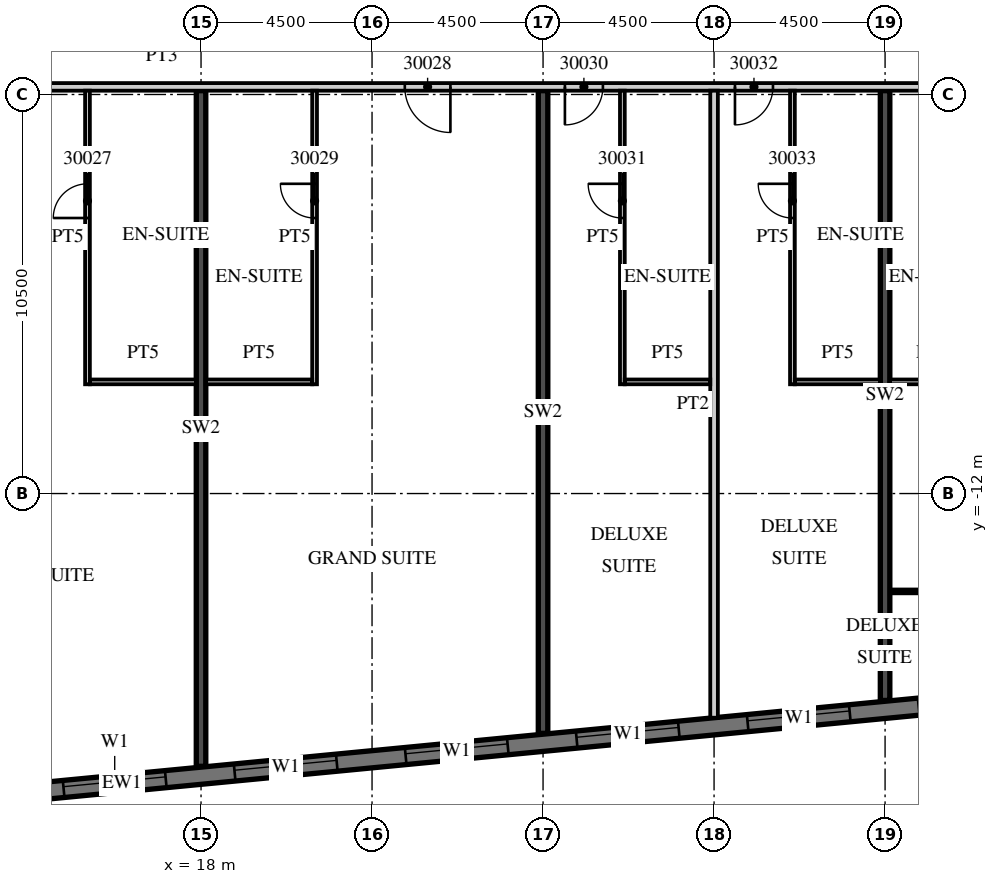
"""IFC4 building model, lengths in metres.
Left out: names, types, materials, properties, quantities, classifications, styles, units other than length and angle.
Written with IfcOpenShell. Run it as: python <this file> out.ifc"""

import sys

from ifc_helpers import new_model, si_unit, direction, frame, frame_2d, origin, place, context, subcontext, project, spatial, rectangle, extrude, element, fill, save


model = new_model("IFC4")
c1 = context("Model", 3, precision=1e-05, world=origin(), true_north=direction((0.0, 1.0)))
c2 = subcontext(c1, "Body", "Model", "MODEL_VIEW")
j1 = project(units=[si_unit("LENGTHUNIT", "METRE"), si_unit("PLANEANGLEUNIT", "RADIAN")], contexts=[c1])
p1 = place(None, origin())
s1 = spatial("IfcSite", under=j1, at=p1, CompositionType="ELEMENT")
p2 = place(p1, origin())
s2 = spatial("IfcBuilding", under=s1, at=p2, CompositionType="ELEMENT")
p3 = place(p2, frame((0.0, 0.0, 133.9)))
s3 = spatial("IfcBuildingStorey", under=s2, at=p3, CompositionType="ELEMENT", Elevation=133.9)
p4 = place(p3, frame((18.0, -19.177, 0.0), z_axis=(0.0, 0.0, 1.0), x_axis=(0.0, 1.0, 0.0)))
e1 = element("IfcWall", 1, at=p4, inside=s3, PredefinedType="SHEAR", context=c2, shape_type="SweptSolid", body=[
    extrude(rectangle(XDim=17.777, YDim=0.25, at=frame_2d((8.889, 0.0))), origin(), (0.0, 0.0, 1.0), 3.3),
])
p5 = place(p3, frame((27.0, -18.311, 0.0), z_axis=(0.0, 0.0, 1.0), x_axis=(0.0, 1.0, 0.0)))
e2 = element("IfcWall", 2, at=p5, inside=s3, PredefinedType="SHEAR", context=c2, shape_type="SweptSolid", body=[
    extrude(rectangle(XDim=16.911, YDim=0.25, at=frame_2d((8.455, 0.0))), origin(), (0.0, 0.0, 1.0), 3.3),
])
p6 = place(p3, frame((36.0, -17.444, 0.0), z_axis=(0.0, 0.0, 1.0), x_axis=(0.0, 1.0, 0.0)))
e3 = element("IfcWall", 3, at=p6, inside=s3, PredefinedType="SHEAR", context=c2, shape_type="SweptSolid", body=[
    extrude(rectangle(XDim=16.044, YDim=0.25, at=frame_2d((8.022, 0.0))), origin(), (0.0, 0.0, 1.0), 3.3),
])
p7 = place(p3, frame((-13.521, -22.46, 0.0), z_axis=(0.0, 0.0, 1.0), x_axis=(0.995396096335, 0.095846812164, 0.0)))
e4 = element("IfcWall", 4, at=p7, inside=s3, PredefinedType="SOLIDWALL", context=c2, shape_type="SweptSolid", body=[
    extrude(rectangle(XDim=59.151, YDim=0.45, at=frame_2d((29.575, 0.0))), origin(), (0.0, 0.0, 1.0), 3.02),
])
p8 = place(p7, frame((0.91, 0.0, 0.45)))
e5 = element("IfcOpeningElement", 5, at=p8, cuts=e4, PredefinedType="OPENING", context=c2, shape_type="SweptSolid", body=[
    extrude(rectangle(XDim=2.7, YDim=2.25, at=frame_2d((1.35, 1.125))), frame((0.0, 0.235, 0.0), z_axis=(0.0, -1.0, 0.0), x_axis=(1.0, 0.0, 0.0)), (0.0, 0.0, 1.0), 0.47),
])
p9 = place(p7, frame((5.431, 0.0, 0.45)))
e6 = element("IfcOpeningElement", 6, at=p9, cuts=e4, PredefinedType="OPENING", context=c2, shape_type="SweptSolid", body=[
    extrude(rectangle(XDim=2.7, YDim=2.25, at=frame_2d((1.35, 1.125))), frame((0.0, 0.235, 0.0), z_axis=(0.0, -1.0, 0.0), x_axis=(1.0, 0.0, 0.0)), (0.0, 0.0, 1.0), 0.47),
])
p10 = place(p7, frame((9.952, 0.0, 0.45)))
e7 = element("IfcOpeningElement", 7, at=p10, cuts=e4, PredefinedType="OPENING", context=c2, shape_type="SweptSolid", body=[
    extrude(rectangle(XDim=2.7, YDim=2.25, at=frame_2d((1.35, 1.125))), frame((0.0, 0.235, 0.0), z_axis=(0.0, -1.0, 0.0), x_axis=(1.0, 0.0, 0.0)), (0.0, 0.0, 1.0), 0.47),
])
p11 = place(p7, frame((14.473, 0.0, 0.45)))
e8 = element("IfcOpeningElement", 8, at=p11, cuts=e4, PredefinedType="OPENING", context=c2, shape_type="SweptSolid", body=[
    extrude(rectangle(XDim=2.7, YDim=2.25, at=frame_2d((1.35, 1.125))), frame((0.0, 0.235, 0.0), z_axis=(0.0, -1.0, 0.0), x_axis=(1.0, 0.0, 0.0)), (0.0, 0.0, 1.0), 0.47),
])
p12 = place(p7, frame((18.994, 0.0, 0.45)))
e9 = element("IfcOpeningElement", 9, at=p12, cuts=e4, PredefinedType="OPENING", context=c2, shape_type="SweptSolid", body=[
    extrude(rectangle(XDim=2.7, YDim=2.25, at=frame_2d((1.35, 1.125))), frame((0.0, 0.235, 0.0), z_axis=(0.0, -1.0, 0.0), x_axis=(1.0, 0.0, 0.0)), (0.0, 0.0, 1.0), 0.47),
])
p13 = place(p7, frame((23.514, 0.0, 0.45)))
e10 = element("IfcOpeningElement", 10, at=p13, cuts=e4, PredefinedType="OPENING", context=c2, shape_type="SweptSolid", body=[
    extrude(rectangle(XDim=2.7, YDim=2.25, at=frame_2d((1.35, 1.125))), frame((0.0, 0.235, 0.0), z_axis=(0.0, -1.0, 0.0), x_axis=(1.0, 0.0, 0.0)), (0.0, 0.0, 1.0), 0.47),
])
p14 = place(p7, frame((28.035, 0.0, 0.45)))
e11 = element("IfcOpeningElement", 11, at=p14, cuts=e4, PredefinedType="OPENING", context=c2, shape_type="SweptSolid", body=[
    extrude(rectangle(XDim=2.7, YDim=2.25, at=frame_2d((1.35, 1.125))), frame((0.0, 0.235, 0.0), z_axis=(0.0, -1.0, 0.0), x_axis=(1.0, 0.0, 0.0)), (0.0, 0.0, 1.0), 0.47),
])
p15 = place(p7, frame((32.556, 0.0, 0.45)))
e12 = element("IfcOpeningElement", 12, at=p15, cuts=e4, PredefinedType="OPENING", context=c2, shape_type="SweptSolid", body=[
    extrude(rectangle(XDim=2.7, YDim=2.25, at=frame_2d((1.35, 1.125))), frame((0.0, 0.235, 0.0), z_axis=(0.0, -1.0, 0.0), x_axis=(1.0, 0.0, 0.0)), (0.0, 0.0, 1.0), 0.47),
])
p16 = place(p7, frame((37.077, 0.0, 0.45)))
e13 = element("IfcOpeningElement", 13, at=p16, cuts=e4, PredefinedType="OPENING", context=c2, shape_type="SweptSolid", body=[
    extrude(rectangle(XDim=2.7, YDim=2.25, at=frame_2d((1.35, 1.125))), frame((0.0, 0.235, 0.0), z_axis=(0.0, -1.0, 0.0), x_axis=(1.0, 0.0, 0.0)), (0.0, 0.0, 1.0), 0.47),
])
p17 = place(p7, frame((41.598, 0.0, 0.45)))
e14 = element("IfcOpeningElement", 14, at=p17, cuts=e4, PredefinedType="OPENING", context=c2, shape_type="SweptSolid", body=[
    extrude(rectangle(XDim=2.7, YDim=2.25, at=frame_2d((1.35, 1.125))), frame((0.0, 0.235, 0.0), z_axis=(0.0, -1.0, 0.0), x_axis=(1.0, 0.0, 0.0)), (0.0, 0.0, 1.0), 0.47),
])
p18 = place(p7, frame((46.118, 0.0, 0.45)))
e15 = element("IfcOpeningElement", 15, at=p18, cuts=e4, PredefinedType="OPENING", context=c2, shape_type="SweptSolid", body=[
    extrude(rectangle(XDim=2.7, YDim=2.25, at=frame_2d((1.35, 1.125))), frame((0.0, 0.235, 0.0), z_axis=(0.0, -1.0, 0.0), x_axis=(1.0, 0.0, 0.0)), (0.0, 0.0, 1.0), 0.47),
])
p19 = place(p7, frame((50.639, 0.0, 0.45)))
e16 = element("IfcOpeningElement", 16, at=p19, cuts=e4, PredefinedType="OPENING", context=c2, shape_type="SweptSolid", body=[
    extrude(rectangle(XDim=2.7, YDim=2.25, at=frame_2d((1.35, 1.125))), frame((0.0, 0.235, 0.0), z_axis=(0.0, -1.0, 0.0), x_axis=(1.0, 0.0, 0.0)), (0.0, 0.0, 1.0), 0.47),
])
p20 = place(p7, frame((55.15, 0.0, 0.45)))
e17 = element("IfcOpeningElement", 17, at=p20, cuts=e4, PredefinedType="OPENING", context=c2, shape_type="SweptSolid", body=[
    extrude(rectangle(XDim=2.7, YDim=2.25, at=frame_2d((1.35, 1.125))), frame((0.0, 0.235, 0.0), z_axis=(0.0, -1.0, 0.0), x_axis=(1.0, 0.0, 0.0)), (0.0, 0.0, 1.0), 0.47),
])
p21 = place(p3, frame((-13.5, -1.3, 0.0), z_axis=(0.0, 0.0, 1.0), x_axis=(1.0, 0.0, 0.0)))
e18 = element("IfcWall", 18, at=p21, inside=s3, PredefinedType="PARTITIONING", context=c2, shape_type="SweptSolid", body=[
    extrude(rectangle(XDim=60.932, YDim=0.2, at=frame_2d((30.466, 0.0))), origin(), (0.0, 0.0, 1.0), 3.02),
])
p22 = place(p21, frame((2.925, 0.0, 0.0)))
e19 = element("IfcOpeningElement", 19, at=p22, cuts=e18, PredefinedType="OPENING", context=c2, shape_type="SweptSolid", body=[
    extrude(rectangle(XDim=1.0, YDim=2.1, at=frame_2d((0.5, 1.05))), frame((0.0, 0.11, 0.0), z_axis=(0.0, -1.0, 0.0), x_axis=(1.0, 0.0, 0.0)), (0.0, 0.0, 1.0), 0.22),
])
p23 = place(p21, frame((9.863, 0.0, 0.0)))
e20 = element("IfcOpeningElement", 20, at=p23, cuts=e18, PredefinedType="OPENING", context=c2, shape_type="SweptSolid", body=[
    extrude(rectangle(XDim=1.2, YDim=2.1, at=frame_2d((0.6, 1.05))), frame((0.0, 0.11, 0.0), z_axis=(0.0, -1.0, 0.0), x_axis=(1.0, 0.0, 0.0)), (0.0, 0.0, 1.0), 0.22),
])
p24 = place(p21, frame((14.075, 0.0, 0.0)))
e21 = element("IfcOpeningElement", 21, at=p24, cuts=e18, PredefinedType="OPENING", context=c2, shape_type="SweptSolid", body=[
    extrude(rectangle(XDim=1.0, YDim=2.1, at=frame_2d((0.5, 1.05))), frame((0.0, 0.11, 0.0), z_axis=(0.0, -1.0, 0.0), x_axis=(1.0, 0.0, 0.0)), (0.0, 0.0, 1.0), 0.22),
])
p25 = place(p21, frame((18.55, 0.0, 0.0)))
e22 = element("IfcOpeningElement", 22, at=p25, cuts=e18, PredefinedType="OPENING", context=c2, shape_type="SweptSolid", body=[
    extrude(rectangle(XDim=1.0, YDim=2.1, at=frame_2d((0.5, 1.05))), frame((0.0, 0.11, 0.0), z_axis=(0.0, -1.0, 0.0), x_axis=(1.0, 0.0, 0.0)), (0.0, 0.0, 1.0), 0.22),
])
p26 = place(p21, frame((24.938, 0.0, 0.0)))
e23 = element("IfcOpeningElement", 23, at=p26, cuts=e18, PredefinedType="OPENING", context=c2, shape_type="SweptSolid", body=[
    extrude(rectangle(XDim=1.2, YDim=2.1, at=frame_2d((0.6, 1.05))), frame((0.0, 0.11, 0.0), z_axis=(0.0, -1.0, 0.0), x_axis=(1.0, 0.0, 0.0)), (0.0, 0.0, 1.0), 0.22),
])
p27 = place(p21, frame((36.862, 0.0, 0.0)))
e24 = element("IfcOpeningElement", 24, at=p27, cuts=e18, PredefinedType="OPENING", context=c2, shape_type="SweptSolid", body=[
    extrude(rectangle(XDim=1.2, YDim=2.1, at=frame_2d((0.6, 1.05))), frame((0.0, 0.11, 0.0), z_axis=(0.0, -1.0, 0.0), x_axis=(1.0, 0.0, 0.0)), (0.0, 0.0, 1.0), 0.22),
])
p28 = place(p21, frame((41.075, 0.0, 0.0)))
e25 = element("IfcOpeningElement", 25, at=p28, cuts=e18, PredefinedType="OPENING", context=c2, shape_type="SweptSolid", body=[
    extrude(rectangle(XDim=1.0, YDim=2.1, at=frame_2d((0.5, 1.05))), frame((0.0, 0.11, 0.0), z_axis=(0.0, -1.0, 0.0), x_axis=(1.0, 0.0, 0.0)), (0.0, 0.0, 1.0), 0.22),
])
p29 = place(p21, frame((45.55, 0.0, 0.0)))
e26 = element("IfcOpeningElement", 26, at=p29, cuts=e18, PredefinedType="OPENING", context=c2, shape_type="SweptSolid", body=[
    extrude(rectangle(XDim=1.0, YDim=2.1, at=frame_2d((0.5, 1.05))), frame((0.0, 0.11, 0.0), z_axis=(0.0, -1.0, 0.0), x_axis=(1.0, 0.0, 0.0)), (0.0, 0.0, 1.0), 0.22),
])
p30 = place(p21, frame((52.425, 0.0, 0.0)))
e27 = element("IfcOpeningElement", 27, at=p30, cuts=e18, PredefinedType="OPENING", context=c2, shape_type="SweptSolid", body=[
    extrude(rectangle(XDim=1.0, YDim=2.1, at=frame_2d((0.5, 1.05))), frame((0.0, 0.11, 0.0), z_axis=(0.0, -1.0, 0.0), x_axis=(1.0, 0.0, 0.0)), (0.0, 0.0, 1.0), 0.22),
])
p31 = place(p21, frame((56.95, 0.0, 0.0)))
e28 = element("IfcOpeningElement", 28, at=p31, cuts=e18, PredefinedType="OPENING", context=c2, shape_type="SweptSolid", body=[
    extrude(rectangle(XDim=1.0, YDim=2.1, at=frame_2d((0.5, 1.05))), frame((0.0, 0.11, 0.0), z_axis=(0.0, -1.0, 0.0), x_axis=(1.0, 0.0, 0.0)), (0.0, 0.0, 1.0), 0.22),
])
p32 = place(p21, frame((59.882, 0.0, 0.0)))
e29 = element("IfcOpeningElement", 29, at=p32, cuts=e18, PredefinedType="OPENING", context=c2, shape_type="SweptSolid", body=[
    extrude(rectangle(XDim=0.9, YDim=2.1, at=frame_2d((0.45, 1.05))), frame((0.0, 0.11, 0.0), z_axis=(0.0, -1.0, 0.0), x_axis=(1.0, 0.0, 0.0)), (0.0, 0.0, 1.0), 0.22),
])
p33 = place(p3, frame((15.012, -9.125, 0.0), z_axis=(0.0, 0.0, 1.0), x_axis=(0.0, 1.0, 0.0)))
e30 = element("IfcWall", 30, at=p33, inside=s3, PredefinedType="PARTITIONING", context=c2, shape_type="SweptSolid", body=[
    extrude(rectangle(XDim=7.725, YDim=0.125, at=frame_2d((3.863, 0.0))), origin(), (0.0, 0.0, 1.0), 3.02),
])
p34 = place(p33, frame((4.375, 0.0, 0.0)))
e31 = element("IfcOpeningElement", 31, at=p34, cuts=e30, PredefinedType="OPENING", context=c2, shape_type="SweptSolid", body=[
    extrude(rectangle(XDim=0.9, YDim=2.1, at=frame_2d((0.45, 1.05))), frame((0.0, 0.073, 0.0), z_axis=(0.0, -1.0, 0.0), x_axis=(1.0, 0.0, 0.0)), (0.0, 0.0, 1.0), 0.145),
])
p35 = place(p3, frame((15.075, -9.062, 0.0), z_axis=(0.0, 0.0, 1.0), x_axis=(1.0, 0.0, 0.0)))
e32 = element("IfcWall", 32, at=p35, inside=s3, PredefinedType="PARTITIONING", context=c2, shape_type="SweptSolid", body=[
    extrude(rectangle(XDim=2.8, YDim=0.125, at=frame_2d((1.4, 0.0))), origin(), (0.0, 0.0, 1.0), 3.02),
])
p36 = place(p3, frame((20.988, -9.125, 0.0), z_axis=(0.0, 0.0, 1.0), x_axis=(0.0, 1.0, 0.0)))
e33 = element("IfcWall", 33, at=p36, inside=s3, PredefinedType="PARTITIONING", context=c2, shape_type="SweptSolid", body=[
    extrude(rectangle(XDim=7.725, YDim=0.125, at=frame_2d((3.863, 0.0))), origin(), (0.0, 0.0, 1.0), 3.02),
])
p37 = place(p36, frame((4.375, 0.0, 0.0)))
e34 = element("IfcOpeningElement", 34, at=p37, cuts=e33, PredefinedType="OPENING", context=c2, shape_type="SweptSolid", body=[
    extrude(rectangle(XDim=0.9, YDim=2.1, at=frame_2d((0.45, 1.05))), frame((0.0, 0.073, 0.0), z_axis=(0.0, -1.0, 0.0), x_axis=(1.0, 0.0, 0.0)), (0.0, 0.0, 1.0), 0.145),
])
p38 = place(p3, frame((18.125, -9.062, 0.0), z_axis=(0.0, 0.0, 1.0), x_axis=(1.0, 0.0, 0.0)))
e35 = element("IfcWall", 35, at=p38, inside=s3, PredefinedType="PARTITIONING", context=c2, shape_type="SweptSolid", body=[
    extrude(rectangle(XDim=2.8, YDim=0.125, at=frame_2d((1.4, 0.0))), origin(), (0.0, 0.0, 1.0), 3.02),
])
p39 = place(p3, frame((31.5, -17.899, 0.0), z_axis=(0.0, 0.0, 1.0), x_axis=(0.0, 1.0, 0.0)))
e36 = element("IfcWall", 36, at=p39, inside=s3, PredefinedType="PARTITIONING", context=c2, shape_type="SweptSolid", body=[
    extrude(rectangle(XDim=16.499, YDim=0.2, at=frame_2d((8.25, 0.0))), origin(), (0.0, 0.0, 1.0), 3.02),
])
p40 = place(p3, frame((29.087, -9.125, 0.0), z_axis=(0.0, 0.0, 1.0), x_axis=(0.0, 1.0, 0.0)))
e37 = element("IfcWall", 37, at=p40, inside=s3, PredefinedType="PARTITIONING", context=c2, shape_type="SweptSolid", body=[
    extrude(rectangle(XDim=7.725, YDim=0.125, at=frame_2d((3.863, 0.0))), origin(), (0.0, 0.0, 1.0), 3.02),
])
p41 = place(p40, frame((4.375, 0.0, 0.0)))
e38 = element("IfcOpeningElement", 38, at=p41, cuts=e37, PredefinedType="OPENING", context=c2, shape_type="SweptSolid", body=[
    extrude(rectangle(XDim=0.9, YDim=2.1, at=frame_2d((0.45, 1.05))), frame((0.0, 0.073, 0.0), z_axis=(0.0, -1.0, 0.0), x_axis=(1.0, 0.0, 0.0)), (0.0, 0.0, 1.0), 0.145),
])
p42 = place(p3, frame((29.15, -9.062, 0.0), z_axis=(0.0, 0.0, 1.0), x_axis=(1.0, 0.0, 0.0)))
e39 = element("IfcWall", 39, at=p42, inside=s3, PredefinedType="PARTITIONING", context=c2, shape_type="SweptSolid", body=[
    extrude(rectangle(XDim=2.25, YDim=0.125, at=frame_2d((1.125, 0.0))), origin(), (0.0, 0.0, 1.0), 3.02),
])
p43 = place(p3, frame((33.562, -9.125, 0.0), z_axis=(0.0, 0.0, 1.0), x_axis=(0.0, 1.0, 0.0)))
e40 = element("IfcWall", 40, at=p43, inside=s3, PredefinedType="PARTITIONING", context=c2, shape_type="SweptSolid", body=[
    extrude(rectangle(XDim=7.725, YDim=0.125, at=frame_2d((3.863, 0.0))), origin(), (0.0, 0.0, 1.0), 3.02),
])
p44 = place(p43, frame((4.375, 0.0, 0.0)))
e41 = element("IfcOpeningElement", 41, at=p44, cuts=e40, PredefinedType="OPENING", context=c2, shape_type="SweptSolid", body=[
    extrude(rectangle(XDim=0.9, YDim=2.1, at=frame_2d((0.45, 1.05))), frame((0.0, 0.073, 0.0), z_axis=(0.0, -1.0, 0.0), x_axis=(1.0, 0.0, 0.0)), (0.0, 0.0, 1.0), 0.145),
])
p45 = place(p3, frame((33.625, -9.062, 0.0), z_axis=(0.0, 0.0, 1.0), x_axis=(1.0, 0.0, 0.0)))
e42 = element("IfcWall", 42, at=p45, inside=s3, PredefinedType="PARTITIONING", context=c2, shape_type="SweptSolid", body=[
    extrude(rectangle(XDim=2.25, YDim=0.125, at=frame_2d((1.125, 0.0))), origin(), (0.0, 0.0, 1.0), 3.02),
])
p46 = place(p3, frame((36.125, -9.062, 0.0), z_axis=(0.0, 0.0, 1.0), x_axis=(1.0, 0.0, 0.0)))
e43 = element("IfcWall", 43, at=p46, inside=s3, PredefinedType="PARTITIONING", context=c2, shape_type="SweptSolid", body=[
    extrude(rectangle(XDim=2.225, YDim=0.125, at=frame_2d((1.113, 0.0))), origin(), (0.0, 0.0, 1.0), 3.02),
])
p47 = place(p3, frame((36.125, -14.575, 0.0), z_axis=(0.0, 0.0, 1.0), x_axis=(1.0, 0.0, 0.0)))
e44 = element("IfcWall", 44, at=p47, inside=s3, PredefinedType="PARTITIONING", context=c2, shape_type="SweptSolid", body=[
    extrude(rectangle(XDim=4.25, YDim=0.1, at=frame_2d((2.125, 0.0))), origin(), (0.0, 0.0, 1.0), 3.02),
])
p48 = place(p47, frame((1.375, 0.0, 0.0)))
e45 = element("IfcOpeningElement", 45, at=p48, cuts=e44, PredefinedType="OPENING", context=c2, shape_type="SweptSolid", body=[
    extrude(rectangle(XDim=1.5, YDim=2.1, at=frame_2d((0.75, 1.05))), frame((0.0, 0.06, 0.0), z_axis=(0.0, -1.0, 0.0), x_axis=(1.0, 0.0, 0.0)), (0.0, 0.0, 1.0), 0.12),
])
p49 = place(p14, origin())
e46 = element("IfcWindow", 46, at=p49, inside=s3, PartitioningType="SINGLE_PANEL", PredefinedType="WINDOW", context=c2, shape_type="SweptSolid", body=[
    extrude(rectangle(XDim=2.7, YDim=2.25, at=frame_2d((1.35, 1.125))), frame((0.0, 0.09, 0.0), z_axis=(0.0, -1.0, 0.0), x_axis=(1.0, 0.0, 0.0)), (0.0, 0.0, 1.0), 0.06),
])
fill(e11, e46)
p50 = place(p15, origin())
e47 = element("IfcWindow", 47, at=p50, inside=s3, PartitioningType="SINGLE_PANEL", PredefinedType="WINDOW", context=c2, shape_type="SweptSolid", body=[
    extrude(rectangle(XDim=2.7, YDim=2.25, at=frame_2d((1.35, 1.125))), frame((0.0, 0.09, 0.0), z_axis=(0.0, -1.0, 0.0), x_axis=(1.0, 0.0, 0.0)), (0.0, 0.0, 1.0), 0.06),
])
fill(e12, e47)
p51 = place(p16, origin())
e48 = element("IfcWindow", 48, at=p51, inside=s3, PartitioningType="SINGLE_PANEL", PredefinedType="WINDOW", context=c2, shape_type="SweptSolid", body=[
    extrude(rectangle(XDim=2.7, YDim=2.25, at=frame_2d((1.35, 1.125))), frame((0.0, 0.09, 0.0), z_axis=(0.0, -1.0, 0.0), x_axis=(1.0, 0.0, 0.0)), (0.0, 0.0, 1.0), 0.06),
])
fill(e13, e48)
p52 = place(p17, origin())
e49 = element("IfcWindow", 49, at=p52, inside=s3, PartitioningType="SINGLE_PANEL", PredefinedType="WINDOW", context=c2, shape_type="SweptSolid", body=[
    extrude(rectangle(XDim=2.7, YDim=2.25, at=frame_2d((1.35, 1.125))), frame((0.0, 0.09, 0.0), z_axis=(0.0, -1.0, 0.0), x_axis=(1.0, 0.0, 0.0)), (0.0, 0.0, 1.0), 0.06),
])
fill(e14, e49)
p53 = place(p18, origin())
e50 = element("IfcWindow", 50, at=p53, inside=s3, PartitioningType="SINGLE_PANEL", PredefinedType="WINDOW", context=c2, shape_type="SweptSolid", body=[
    extrude(rectangle(XDim=2.7, YDim=2.25, at=frame_2d((1.35, 1.125))), frame((0.0, 0.09, 0.0), z_axis=(0.0, -1.0, 0.0), x_axis=(1.0, 0.0, 0.0)), (0.0, 0.0, 1.0), 0.06),
])
fill(e15, e50)
p54 = place(p34, origin())
e51 = element("IfcDoor", 51, at=p54, inside=s3, OperationType="SINGLE_SWING_LEFT", PredefinedType="DOOR", context=c2, shape_type="SweptSolid", body=[
    extrude(rectangle(XDim=0.9, YDim=2.1, at=frame_2d((0.45, 1.05))), frame((0.0, 0.025, 0.0), z_axis=(0.0, -1.0, 0.0), x_axis=(1.0, 0.0, 0.0)), (0.0, 0.0, 1.0), 0.05),
])
fill(e31, e51)
p55 = place(p27, origin())
e52 = element("IfcDoor", 52, at=p55, inside=s3, OperationType="SINGLE_SWING_RIGHT", PredefinedType="DOOR", context=c2, shape_type="SweptSolid", body=[
    extrude(rectangle(XDim=1.2, YDim=2.1, at=frame_2d((0.6, 1.05))), frame((0.0, 0.025, 0.0), z_axis=(0.0, -1.0, 0.0), x_axis=(1.0, 0.0, 0.0)), (0.0, 0.0, 1.0), 0.05),
])
fill(e24, e52)
p56 = place(p37, origin())
e53 = element("IfcDoor", 53, at=p56, inside=s3, OperationType="SINGLE_SWING_RIGHT", PredefinedType="DOOR", context=c2, shape_type="SweptSolid", body=[
    extrude(rectangle(XDim=0.9, YDim=2.1, at=frame_2d((0.45, 1.05))), frame((0.0, 0.025, 0.0), z_axis=(0.0, -1.0, 0.0), x_axis=(1.0, 0.0, 0.0)), (0.0, 0.0, 1.0), 0.05),
])
fill(e34, e53)
p57 = place(p28, origin())
e54 = element("IfcDoor", 54, at=p57, inside=s3, OperationType="SINGLE_SWING_LEFT", PredefinedType="DOOR", context=c2, shape_type="SweptSolid", body=[
    extrude(rectangle(XDim=1.0, YDim=2.1, at=frame_2d((0.5, 1.05))), frame((0.0, 0.025, 0.0), z_axis=(0.0, -1.0, 0.0), x_axis=(1.0, 0.0, 0.0)), (0.0, 0.0, 1.0), 0.05),
])
fill(e25, e54)
p58 = place(p41, origin())
e55 = element("IfcDoor", 55, at=p58, inside=s3, OperationType="SINGLE_SWING_RIGHT", PredefinedType="DOOR", context=c2, shape_type="SweptSolid", body=[
    extrude(rectangle(XDim=0.9, YDim=2.1, at=frame_2d((0.45, 1.05))), frame((0.0, 0.025, 0.0), z_axis=(0.0, -1.0, 0.0), x_axis=(1.0, 0.0, 0.0)), (0.0, 0.0, 1.0), 0.05),
])
fill(e38, e55)
p59 = place(p29, origin())
e56 = element("IfcDoor", 56, at=p59, inside=s3, OperationType="SINGLE_SWING_LEFT", PredefinedType="DOOR", context=c2, shape_type="SweptSolid", body=[
    extrude(rectangle(XDim=1.0, YDim=2.1, at=frame_2d((0.5, 1.05))), frame((0.0, 0.025, 0.0), z_axis=(0.0, -1.0, 0.0), x_axis=(1.0, 0.0, 0.0)), (0.0, 0.0, 1.0), 0.05),
])
fill(e26, e56)
p60 = place(p44, origin())
e57 = element("IfcDoor", 57, at=p60, inside=s3, OperationType="SINGLE_SWING_RIGHT", PredefinedType="DOOR", context=c2, shape_type="SweptSolid", body=[
    extrude(rectangle(XDim=0.9, YDim=2.1, at=frame_2d((0.45, 1.05))), frame((0.0, 0.025, 0.0), z_axis=(0.0, -1.0, 0.0), x_axis=(1.0, 0.0, 0.0)), (0.0, 0.0, 1.0), 0.05),
])
fill(e41, e57)
save(model, sys.argv[1])
